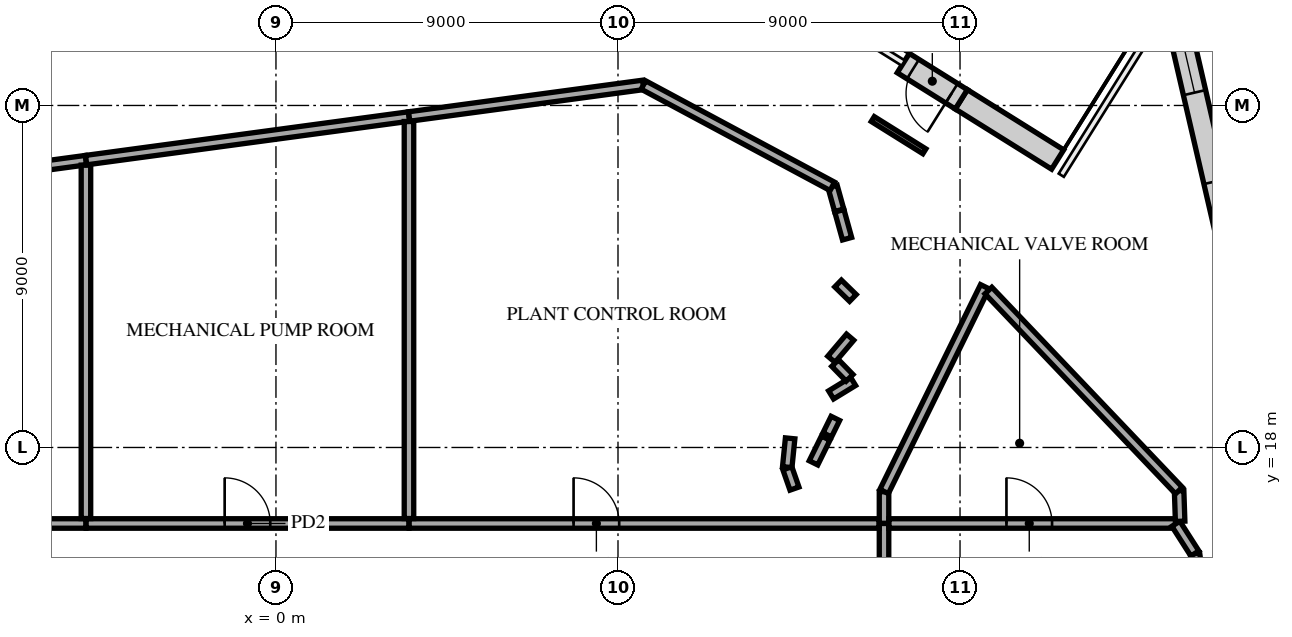
"""IFC4 building model, lengths in metres.
Left out: names, types, materials, properties, quantities, classifications, styles, units other than length and angle.
Written with IfcOpenShell. Run it as: python <this file> out.ifc"""

import sys

from ifc_helpers import new_model, si_unit, direction, frame, frame_2d, origin, place, context, subcontext, project, spatial, rectangle, extrude, element, fill, save


model = new_model("IFC4")
c1 = context("Model", 3, precision=1e-05, world=origin(), true_north=direction((0.0, 1.0)))
c2 = subcontext(c1, "Body", "Model", "MODEL_VIEW")
j1 = project(units=[si_unit("LENGTHUNIT", "METRE"), si_unit("PLANEANGLEUNIT", "RADIAN")], contexts=[c1])
p1 = place(None, origin())
s1 = spatial("IfcSite", under=j1, at=p1, CompositionType="ELEMENT")
p2 = place(p1, origin())
s2 = spatial("IfcBuilding", under=s1, at=p2, CompositionType="ELEMENT")
p3 = place(p2, frame((0.0, 0.0, 76.5)))
s3 = spatial("IfcBuildingStorey", under=s2, at=p3, CompositionType="ELEMENT", Elevation=76.5)
p4 = place(p3, frame((16.0, 7.505, 0.0), z_axis=(0.0, 0.0, 1.0), x_axis=(0.0, 1.0, 0.0)))
e1 = element("IfcWall", 1, at=p4, inside=s3, PredefinedType="PARTITIONING", context=c2, shape_type="SweptSolid", body=[
    extrude(rectangle(XDim=8.495, YDim=0.25, at=frame_2d((4.248, 0.0))), origin(), (0.0, 0.0, 1.0), 4.56),
])
p5 = place(p4, frame((3.645, 0.0, 0.0)))
e2 = element("IfcOpeningElement", 2, at=p5, cuts=e1, PredefinedType="OPENING", context=c2, shape_type="SweptSolid", body=[
    extrude(rectangle(XDim=1.2, YDim=2.1, at=frame_2d((0.6, 1.05))), frame((0.0, 0.135, 0.0), z_axis=(0.0, -1.0, 0.0), x_axis=(1.0, 0.0, 0.0)), (0.0, 0.0, 1.0), 0.27),
])
p6 = place(p3, frame((24.182, 15.206, 0.0), z_axis=(0.0, 0.0, 1.0), x_axis=(0.133897553771, -0.990995179148, 0.0)))
e3 = element("IfcWall", 3, at=p6, inside=s3, PredefinedType="PARTITIONING", context=c2, shape_type="SweptSolid", body=[
    extrude(rectangle(XDim=7.645, YDim=0.25, at=frame_2d((3.823, 0.0))), origin(), (0.0, 0.0, 1.0), 4.152),
])
p7 = place(p3, frame((-15.87, 16.0, 0.0), z_axis=(0.0, 0.0, 1.0), x_axis=(1.0, 0.0, 0.0)))
e4 = element("IfcWall", 4, at=p7, inside=s3, PredefinedType="PARTITIONING", context=c2, shape_type="SweptSolid", body=[
    extrude(rectangle(XDim=10.87, YDim=0.25, at=frame_2d((5.435, 0.0))), origin(), (0.0, 0.0, 1.0), 4.56),
])
p8 = place(p7, frame((4.77, 0.0, 0.0)))
e5 = element("IfcOpeningElement", 5, at=p8, cuts=e4, PredefinedType="OPENING", context=c2, shape_type="SweptSolid", body=[
    extrude(rectangle(XDim=1.2, YDim=2.1, at=frame_2d((0.6, 1.05))), frame((0.0, 0.135, 0.0), z_axis=(0.0, -1.0, 0.0), x_axis=(1.0, 0.0, 0.0)), (0.0, 0.0, 1.0), 0.27),
])
p9 = place(p3, frame((-4.995, 16.0, 0.0), z_axis=(0.0, 0.0, 1.0), x_axis=(1.0, 0.0, 0.0)))
e6 = element("IfcWall", 6, at=p9, inside=s3, PredefinedType="PARTITIONING", context=c2, shape_type="SweptSolid", body=[
    extrude(rectangle(XDim=8.495, YDim=0.25, at=frame_2d((4.248, 0.0))), origin(), (0.0, 0.0, 1.0), 4.56),
])
p10 = place(p9, frame((3.645, 0.0, 0.0)))
e7 = element("IfcOpeningElement", 7, at=p10, cuts=e6, PredefinedType="OPENING", context=c2, shape_type="SweptSolid", body=[
    extrude(rectangle(XDim=1.2, YDim=2.1, at=frame_2d((0.6, 1.05))), frame((0.0, 0.135, 0.0), z_axis=(0.0, -1.0, 0.0), x_axis=(1.0, 0.0, 0.0)), (0.0, 0.0, 1.0), 0.27),
])
p11 = place(p3, frame((3.505, 16.0, 0.0), z_axis=(0.0, 0.0, 1.0), x_axis=(1.0, 0.0, 0.0)))
e8 = element("IfcWall", 8, at=p11, inside=s3, PredefinedType="PARTITIONING", context=c2, shape_type="SweptSolid", body=[
    extrude(rectangle(XDim=12.365, YDim=0.25, at=frame_2d((6.183, 0.0))), origin(), (0.0, 0.0, 1.0), 4.06),
])
p12 = place(p11, frame((4.326, 0.0, 0.0)))
e9 = element("IfcOpeningElement", 9, at=p12, cuts=e8, PredefinedType="OPENING", context=c2, shape_type="SweptSolid", body=[
    extrude(rectangle(XDim=1.2, YDim=2.1, at=frame_2d((0.6, 1.05))), frame((0.0, 0.135, 0.0), z_axis=(0.0, -1.0, 0.0), x_axis=(1.0, 0.0, 0.0)), (0.0, 0.0, 1.0), 0.27),
])
p13 = place(p3, frame((16.0, 16.005, 0.0), z_axis=(0.0, 0.0, 1.0), x_axis=(0.0, 1.0, 0.0)))
e10 = element("IfcWall", 10, at=p13, inside=s3, PredefinedType="PARTITIONING", context=c2, shape_type="SweptSolid", body=[
    extrude(rectangle(XDim=0.831, YDim=0.25, at=frame_2d((0.416, 0.0))), origin(), (0.0, 0.0, 1.0), 4.56),
])
p14 = place(p3, frame((16.13, 16.0, 0.0), z_axis=(0.0, 0.0, 1.0), x_axis=(1.0, 0.0, 0.0)))
e11 = element("IfcWall", 11, at=p14, inside=s3, PredefinedType="PARTITIONING", context=c2, shape_type="SweptSolid", body=[
    extrude(rectangle(XDim=7.544, YDim=0.25, at=frame_2d((3.772, 0.0))), origin(), (0.0, 0.0, 1.0), 4.152),
])
p15 = place(p14, frame((3.092, 0.0, 0.0)))
e12 = element("IfcOpeningElement", 12, at=p15, cuts=e11, PredefinedType="OPENING", context=c2, shape_type="SweptSolid", body=[
    extrude(rectangle(XDim=1.2, YDim=2.1, at=frame_2d((0.6, 1.05))), frame((0.0, 0.135, 0.0), z_axis=(0.0, -1.0, 0.0), x_axis=(1.0, 0.0, 0.0)), (0.0, 0.0, 1.0), 0.27),
])
p16 = place(p3, frame((23.679, 15.992, 0.0), z_axis=(0.0, 0.0, 1.0), x_axis=(0.538866930082, -0.842390901936, 0.0)))
e13 = element("IfcWall", 13, at=p16, inside=s3, PredefinedType="PARTITIONING", context=c2, shape_type="SweptSolid", body=[
    extrude(rectangle(XDim=0.927, YDim=0.25, at=frame_2d((0.464, 0.0))), origin(), (0.0, 0.0, 1.0), 5.18),
])
p17 = place(p3, frame((16.002, 16.841, 0.0), z_axis=(0.0, 0.0, 1.0), x_axis=(0.441137719049, 0.897439420146, 0.0)))
e14 = element("IfcWall", 14, at=p17, inside=s3, PredefinedType="PARTITIONING", context=c2, shape_type="SweptSolid", body=[
    extrude(rectangle(XDim=6.005, YDim=0.25, at=frame_2d((3.003, 0.0))), origin(), (0.0, 0.0, 1.0), 4.56),
])
p18 = place(p3, frame((23.765, 16.862, 0.0), z_axis=(0.0, 0.0, 1.0), x_axis=(0.033688731694, -0.999432373579, 0.0)))
e15 = element("IfcWall", 15, at=p18, inside=s3, PredefinedType="PARTITIONING", context=c2, shape_type="SweptSolid", body=[
    extrude(rectangle(XDim=0.804, YDim=0.25, at=frame_2d((0.402, 0.0))), origin(), (0.0, 0.0, 1.0), 5.18),
])
p19 = place(p3, frame((13.457, 17.453, 0.0), z_axis=(0.0, 0.0, 1.0), x_axis=(0.32939003376, -0.944193944939, 0.0)))
e16 = element("IfcWall", 16, at=p19, inside=s3, PredefinedType="PARTITIONING", context=c2, shape_type="SweptSolid", body=[
    extrude(rectangle(XDim=0.566, YDim=0.25, at=frame_2d((0.283, 0.0))), origin(), (0.0, 0.0, 1.0), 5.18),
])
p20 = place(p3, frame((13.453, 17.482, 0.0), z_axis=(0.0, 0.0, 1.0), x_axis=(0.100328835768, 0.994954332979, 0.0)))
e17 = element("IfcWall", 17, at=p20, inside=s3, PredefinedType="PARTITIONING", context=c2, shape_type="SweptSolid", body=[
    extrude(rectangle(XDim=0.762, YDim=0.25, at=frame_2d((0.381, 0.0))), origin(), (0.0, 0.0, 1.0), 5.18),
])
p21 = place(p3, frame((14.145, 17.595, 0.0), z_axis=(0.0, 0.0, 1.0), x_axis=(0.441008552152, 0.897502900791, 0.0)))
e18 = element("IfcWall", 18, at=p21, inside=s3, PredefinedType="PARTITIONING", context=c2, shape_type="SweptSolid", body=[
    extrude(rectangle(XDim=0.725, YDim=0.25, at=frame_2d((0.363, 0.0))), origin(), (0.0, 0.0, 1.0), 4.56),
])
p22 = place(p3, frame((14.506, 18.331, 0.0), z_axis=(0.0, 0.0, 1.0), x_axis=(0.441139544231, 0.897438522973, 0.0)))
e19 = element("IfcWall", 19, at=p22, inside=s3, PredefinedType="PARTITIONING", context=c2, shape_type="SweptSolid", body=[
    extrude(rectangle(XDim=0.483, YDim=0.25, at=frame_2d((0.242, 0.0))), origin(), (0.0, 0.0, 1.0), 4.56),
])
p23 = place(p3, frame((14.608, 19.383, 0.0), z_axis=(0.0, 0.0, 1.0), x_axis=(0.853210693836, 0.521566402219, 0.0)))
e20 = element("IfcWall", 20, at=p23, inside=s3, PredefinedType="PARTITIONING", context=c2, shape_type="SweptSolid", body=[
    extrude(rectangle(XDim=0.679, YDim=0.25, at=frame_2d((0.339, 0.0))), origin(), (0.0, 0.0, 1.0), 4.56),
])
p24 = place(p3, frame((14.714, 20.222, 0.0), z_axis=(0.0, 0.0, 1.0), x_axis=(0.698077136182, -0.716022563848, 0.0)))
e21 = element("IfcWall", 21, at=p24, inside=s3, PredefinedType="PARTITIONING", context=c2, shape_type="SweptSolid", body=[
    extrude(rectangle(XDim=0.544, YDim=0.25, at=frame_2d((0.272, 0.0))), origin(), (0.0, 0.0, 1.0), 5.18),
])
p25 = place(p3, frame((14.615, 20.322, 0.0), z_axis=(0.0, 0.0, 1.0), x_axis=(0.647406501975, 0.762144882028, 0.0)))
e22 = element("IfcWall", 22, at=p25, inside=s3, PredefinedType="PARTITIONING", context=c2, shape_type="SweptSolid", body=[
    extrude(rectangle(XDim=0.762, YDim=0.25, at=frame_2d((0.381, 0.0))), origin(), (0.0, 0.0, 1.0), 5.18),
])
p26 = place(p3, frame((18.747, 22.13, 0.0), z_axis=(0.0, 0.0, 1.0), x_axis=(0.68963168831, -0.724160296121, 0.0)))
e23 = element("IfcWall", 23, at=p26, inside=s3, PredefinedType="PARTITIONING", context=c2, shape_type="SweptSolid", body=[
    extrude(rectangle(XDim=7.269, YDim=0.25, at=frame_2d((3.634, 0.0))), origin(), (0.0, 0.0, 1.0), 4.152),
])
p27 = place(p3, frame((14.792, 22.315, 0.0), z_axis=(0.0, 0.0, 1.0), x_axis=(0.716028187583, -0.698071367832, 0.0)))
e24 = element("IfcWall", 24, at=p27, inside=s3, PredefinedType="PARTITIONING", context=c2, shape_type="SweptSolid", body=[
    extrude(rectangle(XDim=0.544, YDim=0.25, at=frame_2d((0.272, 0.0))), origin(), (0.0, 0.0, 1.0), 5.18),
])
p28 = place(p3, frame((14.824, 24.228, 0.0), z_axis=(0.0, 0.0, 1.0), x_axis=(0.26756122975, -0.963540859712, 0.0)))
e25 = element("IfcWall", 25, at=p28, inside=s3, PredefinedType="PARTITIONING", context=c2, shape_type="SweptSolid", body=[
    extrude(rectangle(XDim=0.762, YDim=0.25, at=frame_2d((0.381, 0.0))), origin(), (0.0, 0.0, 1.0), 5.18),
])
p29 = place(p3, frame((14.646, 24.868, 0.0), z_axis=(0.0, 0.0, 1.0), x_axis=(0.26762450471, -0.963523286942, 0.0)))
e26 = element("IfcWall", 26, at=p29, inside=s3, PredefinedType="PARTITIONING", context=c2, shape_type="SweptSolid", body=[
    extrude(rectangle(XDim=0.65, YDim=0.25, at=frame_2d((0.325, 0.0))), origin(), (0.0, 0.0, 1.0), 5.18),
])
p30 = place(p3, frame((-8.087, 25.144, 0.0), z_axis=(0.0, 0.0, 1.0), x_axis=(0.990988775484, 0.133944939679, 0.0)))
e27 = element("IfcWall", 27, at=p30, inside=s3, PredefinedType="PARTITIONING", context=c2, shape_type="SweptSolid", body=[
    extrude(rectangle(XDim=3.115, YDim=0.25, at=frame_2d((1.558, 0.0))), origin(), (0.0, 0.0, 1.0), 5.18),
])
p31 = place(p3, frame((-5.0, 16.13, 0.0), z_axis=(0.0, 0.0, 1.0), x_axis=(0.0, 1.0, 0.0)))
e28 = element("IfcWall", 28, at=p31, inside=s3, PredefinedType="PARTITIONING", context=c2, shape_type="SweptSolid", body=[
    extrude(rectangle(XDim=9.3, YDim=0.25, at=frame_2d((4.65, 0.0))), origin(), (0.0, 0.0, 1.0), 5.18),
])
p32 = place(p3, frame((-4.995, 25.562, 0.0), z_axis=(0.0, 0.0, 1.0), x_axis=(0.991004378429, 0.133829450921, 0.0)))
e29 = element("IfcWall", 29, at=p32, inside=s3, PredefinedType="PARTITIONING", context=c2, shape_type="SweptSolid", body=[
    extrude(rectangle(XDim=8.572, YDim=0.25, at=frame_2d((4.286, 0.0))), origin(), (0.0, 0.0, 1.0), 4.152),
])
p33 = place(p3, frame((3.5, 16.13, 0.0), z_axis=(0.0, 0.0, 1.0), x_axis=(0.0, 1.0, 0.0)))
e30 = element("IfcWall", 30, at=p33, inside=s3, PredefinedType="PARTITIONING", context=c2, shape_type="SweptSolid", body=[
    extrude(rectangle(XDim=10.448, YDim=0.25, at=frame_2d((5.224, 0.0))), origin(), (0.0, 0.0, 1.0), 4.56),
])
p34 = place(p3, frame((3.505, 26.71, 0.0), z_axis=(0.0, 0.0, 1.0), x_axis=(0.991003839416, 0.133833442242, 0.0)))
e31 = element("IfcWall", 31, at=p34, inside=s3, PredefinedType="PARTITIONING", context=c2, shape_type="SweptSolid", body=[
    extrude(rectangle(XDim=6.215, YDim=0.25, at=frame_2d((3.107, 0.0))), origin(), (0.0, 0.0, 1.0), 4.152),
])
p35 = place(p3, frame((9.669, 27.539, 0.0), z_axis=(0.0, 0.0, 1.0), x_axis=(0.881158069127, -0.47282180281, 0.0)))
e32 = element("IfcWall", 32, at=p35, inside=s3, PredefinedType="PARTITIONING", context=c2, shape_type="SweptSolid", body=[
    extrude(rectangle(XDim=5.641, YDim=0.25, at=frame_2d((2.821, 0.0))), origin(), (0.0, 0.0, 1.0), 4.06),
])
p36 = place(p3, frame((17.191, 34.45, 0.0), z_axis=(0.0, 0.0, 1.0), x_axis=(-0.974369690746, -0.224952674481, 0.0)))
e33 = element("IfcWall", 33, at=p36, inside=s3, PredefinedType="STANDARD", context=c2, shape_type="SweptSolid", body=[
    extrude(rectangle(XDim=49.376, YDim=0.6, at=frame_2d((24.688, 0.0))), origin(), (0.0, 0.0, 1.0), 5.18),
])
p37 = place(p36, frame((1.2, 0.0, 0.6)))
e34 = element("IfcOpeningElement", 34, at=p37, cuts=e33, PredefinedType="OPENING", context=c2, shape_type="SweptSolid", body=[
    extrude(rectangle(XDim=2.1, YDim=4.13, at=frame_2d((1.05, 2.065))), frame((0.0, 0.31, 0.0), z_axis=(0.0, -1.0, 0.0), x_axis=(1.0, 0.0, 0.0)), (0.0, 0.0, 1.0), 0.62),
])
p38 = place(p36, frame((5.7, 0.0, 0.6)))
e35 = element("IfcOpeningElement", 35, at=p38, cuts=e33, PredefinedType="OPENING", context=c2, shape_type="SweptSolid", body=[
    extrude(rectangle(XDim=2.1, YDim=4.13, at=frame_2d((1.05, 2.065))), frame((0.0, 0.31, 0.0), z_axis=(0.0, -1.0, 0.0), x_axis=(1.0, 0.0, 0.0)), (0.0, 0.0, 1.0), 0.62),
])
p39 = place(p36, frame((10.2, 0.0, 0.6)))
e36 = element("IfcOpeningElement", 36, at=p39, cuts=e33, PredefinedType="OPENING", context=c2, shape_type="SweptSolid", body=[
    extrude(rectangle(XDim=2.1, YDim=4.13, at=frame_2d((1.05, 2.065))), frame((0.0, 0.31, 0.0), z_axis=(0.0, -1.0, 0.0), x_axis=(1.0, 0.0, 0.0)), (0.0, 0.0, 1.0), 0.62),
])
p40 = place(p36, frame((14.7, 0.0, 0.6)))
e37 = element("IfcOpeningElement", 37, at=p40, cuts=e33, PredefinedType="OPENING", context=c2, shape_type="SweptSolid", body=[
    extrude(rectangle(XDim=2.1, YDim=4.13, at=frame_2d((1.05, 2.065))), frame((0.0, 0.31, 0.0), z_axis=(0.0, -1.0, 0.0), x_axis=(1.0, 0.0, 0.0)), (0.0, 0.0, 1.0), 0.62),
])
p41 = place(p36, frame((19.2, 0.0, 0.6)))
e38 = element("IfcOpeningElement", 38, at=p41, cuts=e33, PredefinedType="OPENING", context=c2, shape_type="SweptSolid", body=[
    extrude(rectangle(XDim=2.1, YDim=4.13, at=frame_2d((1.05, 2.065))), frame((0.0, 0.31, 0.0), z_axis=(0.0, -1.0, 0.0), x_axis=(1.0, 0.0, 0.0)), (0.0, 0.0, 1.0), 0.62),
])
p42 = place(p36, frame((46.138, 0.0, 0.6)))
e39 = element("IfcOpeningElement", 39, at=p42, cuts=e33, PredefinedType="OPENING", context=c2, shape_type="SweptSolid", body=[
    extrude(rectangle(XDim=2.1, YDim=4.13, at=frame_2d((1.05, 2.065))), frame((0.0, 0.31, 0.0), z_axis=(0.0, -1.0, 0.0), x_axis=(1.0, 0.0, 0.0)), (0.0, 0.0, 1.0), 0.62),
])
p43 = place(p3, frame((34.535, -17.557, 0.0), z_axis=(0.0, 0.0, 1.0), x_axis=(-0.224952674481, 0.974369690746, 0.0)))
e40 = element("IfcWall", 40, at=p43, inside=s3, PredefinedType="STANDARD", context=c2, shape_type="SweptSolid", body=[
    extrude(rectangle(XDim=49.376, YDim=0.6, at=frame_2d((24.688, 0.0))), origin(), (0.0, 0.0, 1.0), 5.18),
])
p44 = place(p43, frame((1.138, 0.0, 0.6)))
e41 = element("IfcOpeningElement", 41, at=p44, cuts=e40, PredefinedType="OPENING", context=c2, shape_type="SweptSolid", body=[
    extrude(rectangle(XDim=2.1, YDim=4.13, at=frame_2d((1.05, 2.065))), frame((0.0, 0.31, 0.0), z_axis=(0.0, -1.0, 0.0), x_axis=(1.0, 0.0, 0.0)), (0.0, 0.0, 1.0), 0.62),
])
p45 = place(p43, frame((5.576, 0.0, 0.6)))
e42 = element("IfcOpeningElement", 42, at=p45, cuts=e40, PredefinedType="OPENING", context=c2, shape_type="SweptSolid", body=[
    extrude(rectangle(XDim=2.1, YDim=4.13, at=frame_2d((1.05, 2.065))), frame((0.0, 0.31, 0.0), z_axis=(0.0, -1.0, 0.0), x_axis=(1.0, 0.0, 0.0)), (0.0, 0.0, 1.0), 0.62),
])
p46 = place(p43, frame((41.576, 0.0, 0.6)))
e43 = element("IfcOpeningElement", 43, at=p46, cuts=e40, PredefinedType="OPENING", context=c2, shape_type="SweptSolid", body=[
    extrude(rectangle(XDim=2.1, YDim=4.13, at=frame_2d((1.05, 2.065))), frame((0.0, 0.31, 0.0), z_axis=(0.0, -1.0, 0.0), x_axis=(1.0, 0.0, 0.0)), (0.0, 0.0, 1.0), 0.62),
])
p47 = place(p43, frame((46.076, 0.0, 0.6)))
e44 = element("IfcOpeningElement", 44, at=p47, cuts=e40, PredefinedType="OPENING", context=c2, shape_type="SweptSolid", body=[
    extrude(rectangle(XDim=2.1, YDim=4.13, at=frame_2d((1.05, 2.065))), frame((0.0, 0.31, 0.0), z_axis=(0.0, -1.0, 0.0), x_axis=(1.0, 0.0, 0.0)), (0.0, 0.0, 1.0), 0.62),
])
p48 = place(p3, frame((20.569, 25.578, 0.0), z_axis=(0.0, 0.0, 1.0), x_axis=(-0.848048774501, 0.529918178654, 0.0)))
e45 = element("IfcWall", 45, at=p48, inside=s3, PredefinedType="STANDARD", context=c2, shape_type="SweptSolid", body=[
    extrude(rectangle(XDim=2.989, YDim=0.6, at=frame_2d((1.495, 0.0))), origin(), (0.0, 0.0, 1.0), 5.18),
])
p49 = place(p3, frame((18.034, 27.162, 0.0), z_axis=(0.0, 0.0, 1.0), x_axis=(-0.848028783771, 0.529950169257, 0.0)))
e46 = element("IfcWall", 46, at=p49, inside=s3, PredefinedType="STANDARD", context=c2, shape_type="SweptSolid", body=[
    extrude(rectangle(XDim=1.8, YDim=0.6, at=frame_2d((0.9, 0.0))), origin(), (0.0, 0.0, 1.0), 5.18),
])
p50 = place(p49, frame((0.3, 0.0, 0.0)))
e47 = element("IfcOpeningElement", 47, at=p50, cuts=e46, PredefinedType="OPENING", context=c2, shape_type="SweptSolid", body=[
    extrude(rectangle(XDim=1.2, YDim=2.4, at=frame_2d((0.6, 1.2))), frame((0.0, 0.31, 0.0), z_axis=(0.0, -1.0, 0.0), x_axis=(1.0, 0.0, 0.0)), (0.0, 0.0, 1.0), 0.62),
])
p51 = place(p3, frame((17.061, 25.794, 0.0), z_axis=(0.0, 0.0, 1.0), x_axis=(-0.848006877016, 0.52998522294, 0.0)))
e48 = element("IfcWall", 48, at=p51, inside=s3, PredefinedType="PARTITIONING", context=c2, shape_type="SweptSolid", body=[
    extrude(rectangle(XDim=1.6, YDim=0.15, at=frame_2d((0.8, 0.0))), origin(), (0.0, 0.0, 1.0), 0.7),
])
p52 = place(p10, origin())
e49 = element("IfcDoor", 49, at=p52, inside=s3, OperationType="SINGLE_SWING_LEFT", PredefinedType="DOOR", context=c2, shape_type="SweptSolid", body=[
    extrude(rectangle(XDim=1.2, YDim=2.1, at=frame_2d((0.6, 1.05))), frame((0.0, 0.025, 0.0), z_axis=(0.0, -1.0, 0.0), x_axis=(1.0, 0.0, 0.0)), (0.0, 0.0, 1.0), 0.05),
])
fill(e7, e49)
p53 = place(p12, origin())
e50 = element("IfcDoor", 50, at=p53, inside=s3, OperationType="SINGLE_SWING_RIGHT", PredefinedType="DOOR", context=c2, shape_type="SweptSolid", body=[
    extrude(rectangle(XDim=1.2, YDim=2.1, at=frame_2d((0.6, 1.05))), frame((0.0, 0.025, 0.0), z_axis=(0.0, -1.0, 0.0), x_axis=(1.0, 0.0, 0.0)), (0.0, 0.0, 1.0), 0.05),
])
fill(e9, e50)
p54 = place(p15, origin())
e51 = element("IfcDoor", 51, at=p54, inside=s3, OperationType="SINGLE_SWING_RIGHT", PredefinedType="DOOR", context=c2, shape_type="SweptSolid", body=[
    extrude(rectangle(XDim=1.2, YDim=2.1, at=frame_2d((0.6, 1.05))), frame((0.0, 0.025, 0.0), z_axis=(0.0, -1.0, 0.0), x_axis=(1.0, 0.0, 0.0)), (0.0, 0.0, 1.0), 0.05),
])
fill(e12, e51)
p55 = place(p47, origin())
e52 = element("IfcWindow", 52, at=p55, inside=s3, PartitioningType="SINGLE_PANEL", PredefinedType="USERDEFINED", context=c2, shape_type="SweptSolid", body=[
    extrude(rectangle(XDim=2.1, YDim=4.13, at=frame_2d((1.05, 2.065))), frame((0.0, 0.03, 0.0), z_axis=(0.0, -1.0, 0.0), x_axis=(1.0, 0.0, 0.0)), (0.0, 0.0, 1.0), 0.06),
])
fill(e44, e52)
p56 = place(p50, origin())
e53 = element("IfcDoor", 53, at=p56, inside=s3, OperationType="SINGLE_SWING_LEFT", PredefinedType="DOOR", context=c2, shape_type="SweptSolid", body=[
    extrude(rectangle(XDim=1.2, YDim=2.4, at=frame_2d((0.6, 1.2))), frame((0.0, 0.025, 0.0), z_axis=(0.0, -1.0, 0.0), x_axis=(1.0, 0.0, 0.0)), (0.0, 0.0, 1.0), 0.05),
])
fill(e47, e53)
save(model, sys.argv[1])
